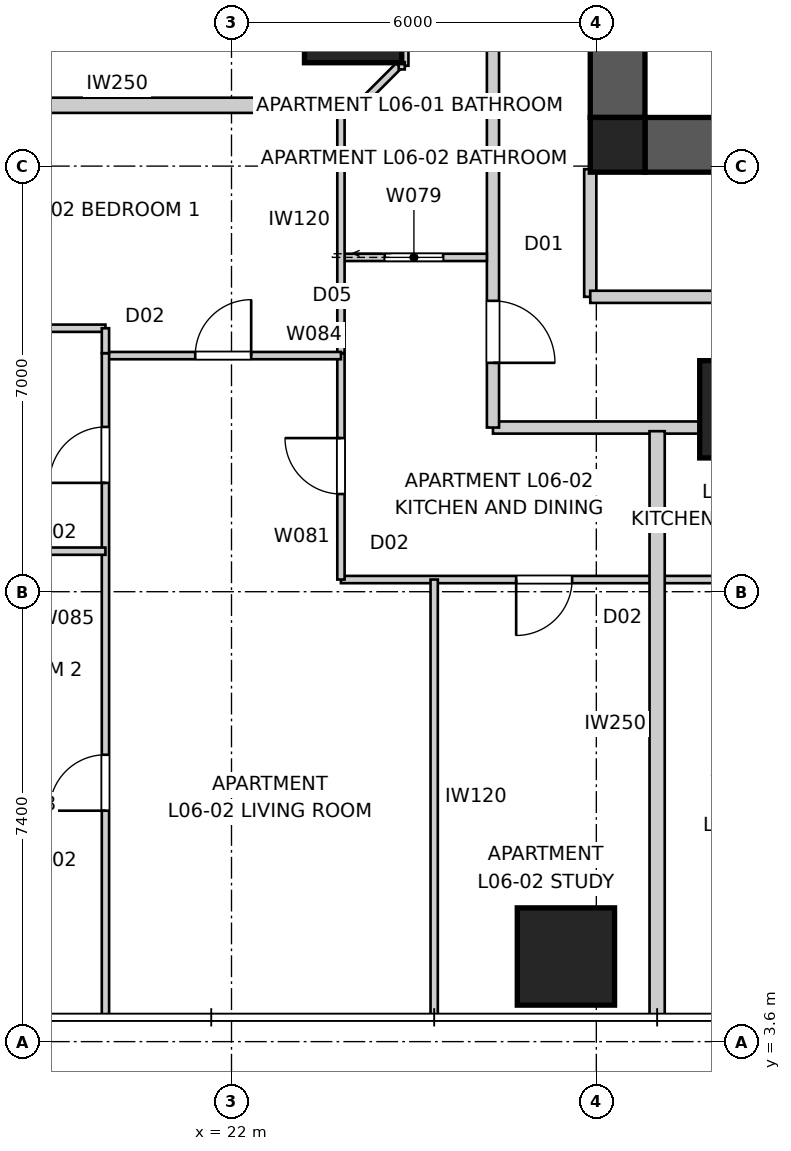
"""IFC4 building model, lengths in metres.
Left out: names, types, materials, properties, quantities, classifications, styles, units other than length and angle.
Written with IfcOpenShell. Run it as: python <this file> out.ifc"""

import sys

from ifc_helpers import new_model, si_unit, direction, frame, frame_2d, origin, origin_2d, place, context, subcontext, project, spatial, polyline, rectangle, outline, extrude, element, fill, save


model = new_model("IFC4")
c1 = context("Model", 3, precision=1e-05, world=origin(), true_north=direction((0.0, 1.0)))
c2 = subcontext(c1, "Body", "Model", "MODEL_VIEW")
j1 = project(units=[si_unit("LENGTHUNIT", "METRE"), si_unit("PLANEANGLEUNIT", "RADIAN")], contexts=[c1])
p1 = place(None, origin())
s1 = spatial("IfcSite", under=j1, at=p1, CompositionType="ELEMENT")
p2 = place(p1, origin())
s2 = spatial("IfcBuilding", under=s1, at=p2, CompositionType="ELEMENT")
p3 = place(p2, frame((0.0, 0.0, 25.2)))
s3 = spatial("IfcBuildingStorey", under=s2, at=p3, CompositionType="ELEMENT", Elevation=25.2)
p4 = place(p3, frame((51.2, 18.35, 0.0), z_axis=(0.0, 0.0, 1.0), x_axis=(-1.0, 0.0, 0.0)))
e1 = element("IfcWall", 1, at=p4, inside=s3, PredefinedType="SHEAR", context=c2, shape_type="SweptSolid", body=[
    extrude(outline(polyline([(0.0, -0.45), (22.4, -0.45), (22.4, -0.025), (22.85, -0.025), (22.85, 0.025), (22.4, 0.025), (22.4, 0.45), (0.0, 0.45), (0.0, 0.025), (-0.45, 0.025), (-0.45, -0.025), (0.0, -0.025), (0.0, -0.45)])), origin(), (0.0, 0.0, 1.0), 3.4),
])
p5 = place(p3, frame((28.35, 41.2, 0.0), z_axis=(0.0, 0.0, 1.0), x_axis=(0.0, -1.0, 0.0)))
e2 = element("IfcWall", 2, at=p5, inside=s3, PredefinedType="SHEAR", context=c2, shape_type="SweptSolid", body=[
    extrude(outline(polyline([(0.0, -0.45), (22.4, -0.45), (22.4, -0.025), (22.85, -0.025), (22.85, 0.025), (22.4, 0.025), (22.4, 0.45), (0.0, 0.45), (0.0, 0.025), (-0.45, 0.025), (-0.45, -0.025), (0.0, -0.025), (0.0, -0.45)])), origin(), (0.0, 0.0, 1.0), 3.4),
])
p6 = place(p5, frame((11.14, 0.0, 0.0)))
e3 = element("IfcOpeningElement", 3, at=p6, cuts=e2, PredefinedType="OPENING", context=c2, shape_type="SweptSolid", body=[
    extrude(rectangle(XDim=1.02, YDim=2.4, at=frame_2d((0.51, 1.2))), frame((0.0, 0.46, 0.0), z_axis=(0.0, -1.0, 0.0), x_axis=(1.0, 0.0, 0.0)), (0.0, 0.0, 1.0), 0.92),
])
p7 = place(p3, frame((28.35, 18.35, 0.0), z_axis=(0.0, 0.0, 1.0), x_axis=(1.0, 0.0, 0.0)))
e4 = element("IfcColumn", 4, at=p7, inside=s3, PredefinedType="COLUMN", context=c2, shape_type="SweptSolid", body=[
    extrude(rectangle(XDim=0.9, YDim=0.9, at=origin_2d()), origin(), (0.0, 0.0, 1.0), 3.4),
])
for number, where, z_axis, x_axis in (
    (5, (27.5, 5.0, 0.0), (0.0, 0.0, 1.0), (1.0, 0.0, 0.0)),
    (6, (24.0, 20.5, 0.0), (0.0, 0.0, 1.0), (1.0, 0.0, 0.0)),
    (7, (30.5, 14.0, 0.0), (0.0, 0.0, 1.0), (1.0, 0.0, 0.0)),
):
    element("IfcColumn", number, at=place(p3, frame(where, z_axis=z_axis, x_axis=x_axis)), inside=s3, PredefinedType="COLUMN", context=c2, shape_type="SweptSolid", body=[
        extrude(rectangle(XDim=1.6, YDim=1.6, at=origin_2d()), origin(), (0.0, 0.0, 1.0), 3.4),
    ])
p8 = place(p3, frame((26.3, 13.7, 0.0), z_axis=(0.0, 0.0, 1.0), x_axis=(1.0, 0.0, 0.0)))
e8 = element("IfcWall", 8, at=p8, inside=s3, PredefinedType="PARTITIONING", context=c2, shape_type="SweptSolid", body=[
    extrude(rectangle(XDim=4.458, YDim=0.2, at=frame_2d((2.229, 0.0))), origin(), (0.0, 0.0, 1.0), 3.25),
])
p9 = place(p3, frame((26.3, 46.3, 0.0), z_axis=(0.0, 0.0, 1.0), x_axis=(0.0, -1.0, 0.0)))
e9 = element("IfcWall", 9, at=p9, inside=s3, PredefinedType="PARTITIONING", context=c2, shape_type="SweptSolid", body=[
    extrude(rectangle(XDim=32.6, YDim=0.2, at=frame_2d((16.3, 0.0))), origin(), (0.0, 0.0, 1.0), 3.25),
])
p10 = place(p9, frame((2.315, 0.0, 0.0)))
e10 = element("IfcOpeningElement", 10, at=p10, cuts=e9, PredefinedType="OPENING", context=c2, shape_type="SweptSolid", body=[
    extrude(rectangle(XDim=1.02, YDim=2.34, at=frame_2d((0.51, 1.17))), frame((0.0, 0.11, 0.0), z_axis=(0.0, -1.0, 0.0), x_axis=(1.0, 0.0, 0.0)), (0.0, 0.0, 1.0), 0.22),
])
p11 = place(p9, frame((10.624, 0.0, 0.0)))
e11 = element("IfcOpeningElement", 11, at=p11, cuts=e9, PredefinedType="OPENING", context=c2, shape_type="SweptSolid", body=[
    extrude(rectangle(XDim=1.02, YDim=2.34, at=frame_2d((0.51, 1.17))), frame((0.0, 0.11, 0.0), z_axis=(0.0, -1.0, 0.0), x_axis=(1.0, 0.0, 0.0)), (0.0, 0.0, 1.0), 0.22),
])
p12 = place(p9, frame((17.848, 0.0, 0.0)))
e12 = element("IfcOpeningElement", 12, at=p12, cuts=e9, PredefinedType="OPENING", context=c2, shape_type="SweptSolid", body=[
    extrude(rectangle(XDim=1.02, YDim=2.34, at=frame_2d((0.51, 1.17))), frame((0.0, 0.11, 0.0), z_axis=(0.0, -1.0, 0.0), x_axis=(1.0, 0.0, 0.0)), (0.0, 0.0, 1.0), 0.22),
])
p13 = place(p9, frame((30.516, 0.0, 0.0)))
e13 = element("IfcOpeningElement", 13, at=p13, cuts=e9, PredefinedType="OPENING", context=c2, shape_type="SweptSolid", body=[
    extrude(rectangle(XDim=1.02, YDim=2.34, at=frame_2d((0.51, 1.17))), frame((0.0, 0.11, 0.0), z_axis=(0.0, -1.0, 0.0), x_axis=(1.0, 0.0, 0.0)), (0.0, 0.0, 1.0), 0.22),
])
p14 = place(p3, frame((29.0, 4.0, 0.0), z_axis=(0.0, 0.0, 1.0), x_axis=(0.0, 1.0, 0.0)))
e14 = element("IfcWall", 14, at=p14, inside=s3, PredefinedType="PARTITIONING", context=c2, shape_type="SweptSolid", body=[
    extrude(rectangle(XDim=9.64, YDim=0.25, at=frame_2d((4.82, 0.0))), origin(), (0.0, 0.0, 1.0), 3.25),
])
p15 = place(p3, frame((14.0, 19.0, 0.0), z_axis=(0.0, 0.0, 1.0), x_axis=(1.0, 0.0, 0.0)))
e15 = element("IfcWall", 15, at=p15, inside=s3, PredefinedType="PARTITIONING", context=c2, shape_type="SweptSolid", body=[
    extrude(rectangle(XDim=12.24, YDim=0.25, at=frame_2d((6.12, 0.0))), origin(), (0.0, 0.0, 1.0), 3.25),
])
p16 = place(p3, frame((27.9, 17.95, 0.0), z_axis=(0.0, 0.0, 1.0), x_axis=(0.0, -1.0, 0.0)))
e16 = element("IfcWall", 16, at=p16, inside=s3, PredefinedType="PARTITIONING", context=c2, shape_type="SweptSolid", body=[
    extrude(rectangle(XDim=2.1, YDim=0.2, at=frame_2d((1.05, 0.0))), origin(), (0.0, 0.0, 1.0), 3.25),
])
p17 = place(p3, frame((27.9, 15.85, 0.0), z_axis=(0.0, 0.0, 1.0), x_axis=(1.0, 0.0, 0.0)))
e17 = element("IfcWall", 17, at=p17, inside=s3, PredefinedType="PARTITIONING", context=c2, shape_type="SweptSolid", body=[
    extrude(rectangle(XDim=24.2, YDim=0.2, at=frame_2d((12.1, 0.0))), origin(), (0.0, 0.0, 1.0), 3.25),
])
p18 = place(p17, frame((12.437, 0.0, 0.0)))
e18 = element("IfcOpeningElement", 18, at=p18, cuts=e17, PredefinedType="OPENING", context=c2, shape_type="SweptSolid", body=[
    extrude(rectangle(XDim=1.02, YDim=2.1, at=frame_2d((0.51, 1.05))), frame((0.0, 0.11, 0.0), z_axis=(0.0, -1.0, 0.0), x_axis=(1.0, 0.0, 0.0)), (0.0, 0.0, 1.0), 0.22),
])
p19 = place(p17, frame((3.544, 0.0, 0.0)))
e19 = element("IfcOpeningElement", 19, at=p19, cuts=e17, PredefinedType="OPENING", context=c2, shape_type="SweptSolid", body=[
    extrude(rectangle(XDim=1.02, YDim=2.1, at=frame_2d((0.51, 1.05))), frame((0.0, 0.11, 0.0), z_axis=(0.0, -1.0, 0.0), x_axis=(1.0, 0.0, 0.0)), (0.0, 0.0, 1.0), 0.22),
])
p20 = place(p17, frame((19.733, 0.0, 0.0)))
e20 = element("IfcOpeningElement", 20, at=p20, cuts=e17, PredefinedType="OPENING", context=c2, shape_type="SweptSolid", body=[
    extrude(rectangle(XDim=1.02, YDim=2.1, at=frame_2d((0.51, 1.05))), frame((0.0, 0.11, 0.0), z_axis=(0.0, -1.0, 0.0), x_axis=(1.0, 0.0, 0.0)), (0.0, 0.0, 1.0), 0.22),
])
p21 = place(p3, frame((24.1, 19.0, 0.0), z_axis=(0.0, 0.0, 1.0), x_axis=(0.707106781187, 0.707106781187, 0.0)))
e21 = element("IfcWall", 21, at=p21, inside=s3, PredefinedType="PARTITIONING", context=c2, shape_type="SweptSolid", body=[
    extrude(rectangle(XDim=0.919, YDim=0.12, at=frame_2d((0.459, 0.0))), origin(), (0.0, 0.0, 1.0), 3.25),
])
p22 = place(p3, frame((24.85, 19.65, 0.0), z_axis=(0.0, 0.0, 1.0), x_axis=(0.0, 1.0, 0.0)))
e22 = element("IfcWall", 22, at=p22, inside=s3, PredefinedType="PARTITIONING", context=c2, shape_type="SweptSolid", body=[
    extrude(rectangle(XDim=1.7, YDim=0.12, at=frame_2d((0.85, 0.0))), origin(), (0.0, 0.0, 1.0), 3.25),
])
p23 = place(p3, frame((23.8, 16.499, 0.0), z_axis=(0.0, 0.0, 1.0), x_axis=(1.0, 0.0, 0.0)))
e23 = element("IfcWall", 23, at=p23, inside=s3, PredefinedType="PARTITIONING", context=c2, shape_type="SweptSolid", body=[
    extrude(rectangle(XDim=2.4, YDim=0.12, at=frame_2d((1.2, 0.0))), origin(), (0.0, 0.0, 1.0), 3.25),
])
p24 = place(p23, frame((0.72, 0.0, 0.0)))
e24 = element("IfcOpeningElement", 24, at=p24, cuts=e23, PredefinedType="OPENING", context=c2, shape_type="SweptSolid", body=[
    extrude(rectangle(XDim=0.96, YDim=2.1, at=frame_2d((0.48, 1.05))), frame((0.0, 0.07, 0.0), z_axis=(0.0, -1.0, 0.0), x_axis=(1.0, 0.0, 0.0)), (0.0, 0.0, 1.0), 0.14),
])
p25 = place(p3, frame((56.2, 11.2, 0.0), z_axis=(0.0, 0.0, 1.0), x_axis=(-1.0, 0.0, 0.0)))
e25 = element("IfcWall", 25, at=p25, inside=s3, PredefinedType="PARTITIONING", context=c2, shape_type="SweptSolid", body=[
    extrude(rectangle(XDim=32.4, YDim=0.12, at=frame_2d((16.2, 0.0))), origin(), (0.0, 0.0, 1.0), 3.25),
])
p26 = place(p25, frame((24.882, 0.0, 0.0)))
e26 = element("IfcOpeningElement", 26, at=p26, cuts=e25, PredefinedType="OPENING", context=c2, shape_type="SweptSolid", body=[
    extrude(rectangle(XDim=0.92, YDim=2.34, at=frame_2d((0.46, 1.17))), frame((0.0, 0.07, 0.0), z_axis=(0.0, -1.0, 0.0), x_axis=(1.0, 0.0, 0.0)), (0.0, 0.0, 1.0), 0.14),
])
p27 = place(p25, frame((22.477, 0.0, 0.0)))
e27 = element("IfcOpeningElement", 27, at=p27, cuts=e25, PredefinedType="OPENING", context=c2, shape_type="SweptSolid", body=[
    extrude(rectangle(XDim=0.92, YDim=2.34, at=frame_2d((0.46, 1.17))), frame((0.0, 0.07, 0.0), z_axis=(0.0, -1.0, 0.0), x_axis=(1.0, 0.0, 0.0)), (0.0, 0.0, 1.0), 0.14),
])
p28 = place(p25, frame((6.598, 0.0, 0.0)))
e28 = element("IfcOpeningElement", 28, at=p28, cuts=e25, PredefinedType="OPENING", context=c2, shape_type="SweptSolid", body=[
    extrude(rectangle(XDim=0.92, YDim=2.34, at=frame_2d((0.46, 1.17))), frame((0.0, 0.07, 0.0), z_axis=(0.0, -1.0, 0.0), x_axis=(1.0, 0.0, 0.0)), (0.0, 0.0, 1.0), 0.14),
])
p29 = place(p25, frame((28.598, 0.0, 0.0)))
e29 = element("IfcOpeningElement", 29, at=p29, cuts=e25, PredefinedType="OPENING", context=c2, shape_type="SweptSolid", body=[
    extrude(rectangle(XDim=0.92, YDim=2.34, at=frame_2d((0.46, 1.17))), frame((0.0, 0.07, 0.0), z_axis=(0.0, -1.0, 0.0), x_axis=(1.0, 0.0, 0.0)), (0.0, 0.0, 1.0), 0.14),
])
p30 = place(p25, frame((2.862, 0.0, 0.0)))
e30 = element("IfcOpeningElement", 30, at=p30, cuts=e25, PredefinedType="OPENING", context=c2, shape_type="SweptSolid", body=[
    extrude(rectangle(XDim=0.96, YDim=2.1, at=frame_2d((0.48, 1.05))), frame((0.0, 0.07, 0.0), z_axis=(0.0, -1.0, 0.0), x_axis=(1.0, 0.0, 0.0)), (0.0, 0.0, 1.0), 0.14),
])
p31 = place(p25, frame((10.363, 0.0, 0.0)))
e31 = element("IfcOpeningElement", 31, at=p31, cuts=e25, PredefinedType="OPENING", context=c2, shape_type="SweptSolid", body=[
    extrude(rectangle(XDim=0.96, YDim=2.1, at=frame_2d((0.48, 1.05))), frame((0.0, 0.07, 0.0), z_axis=(0.0, -1.0, 0.0), x_axis=(1.0, 0.0, 0.0)), (0.0, 0.0, 1.0), 0.14),
])
p32 = place(p25, frame((13.862, 0.0, 0.0)))
e32 = element("IfcOpeningElement", 32, at=p32, cuts=e25, PredefinedType="OPENING", context=c2, shape_type="SweptSolid", body=[
    extrude(rectangle(XDim=0.96, YDim=2.1, at=frame_2d((0.48, 1.05))), frame((0.0, 0.07, 0.0), z_axis=(0.0, -1.0, 0.0), x_axis=(1.0, 0.0, 0.0)), (0.0, 0.0, 1.0), 0.14),
])
p33 = place(p25, frame((17.529, 0.0, 0.0)))
e33 = element("IfcOpeningElement", 33, at=p33, cuts=e25, PredefinedType="OPENING", context=c2, shape_type="SweptSolid", body=[
    extrude(rectangle(XDim=0.96, YDim=2.1, at=frame_2d((0.48, 1.05))), frame((0.0, 0.07, 0.0), z_axis=(0.0, -1.0, 0.0), x_axis=(1.0, 0.0, 0.0)), (0.0, 0.0, 1.0), 0.14),
])
p34 = place(p3, frame((23.8, 11.2, 0.0), z_axis=(0.0, 0.0, 1.0), x_axis=(0.0, 1.0, 0.0)))
e34 = element("IfcWall", 34, at=p34, inside=s3, PredefinedType="PARTITIONING", context=c2, shape_type="SweptSolid", body=[
    extrude(rectangle(XDim=3.723, YDim=0.12, at=frame_2d((1.862, 0.0))), origin(), (0.0, 0.0, 1.0), 3.25),
])
p35 = place(p34, frame((1.407, 0.0, 0.0)))
e35 = element("IfcOpeningElement", 35, at=p35, cuts=e34, PredefinedType="OPENING", context=c2, shape_type="SweptSolid", body=[
    extrude(rectangle(XDim=0.92, YDim=2.34, at=frame_2d((0.46, 1.17))), frame((0.0, 0.07, 0.0), z_axis=(0.0, -1.0, 0.0), x_axis=(1.0, 0.0, 0.0)), (0.0, 0.0, 1.0), 0.14),
])
p36 = place(p3, frame((23.8, 15.233, 0.0), z_axis=(0.0, 0.0, 1.0), x_axis=(0.0, 1.0, 0.0)))
e36 = element("IfcWall", 36, at=p36, inside=s3, PredefinedType="PARTITIONING", context=c2, shape_type="SweptSolid", body=[
    extrude(rectangle(XDim=3.767, YDim=0.12, at=frame_2d((1.883, 0.0))), origin(), (0.0, 0.0, 1.0), 3.25),
])
p37 = place(p3, frame((19.927, 14.883, 0.0), z_axis=(0.0, 0.0, 1.0), x_axis=(1.0, 0.0, 0.0)))
e37 = element("IfcWall", 37, at=p37, inside=s3, PredefinedType="PARTITIONING", context=c2, shape_type="SweptSolid", body=[
    extrude(rectangle(XDim=3.873, YDim=0.12, at=frame_2d((1.937, 0.0))), origin(), (0.0, 0.0, 1.0), 3.25),
])
p38 = place(p37, frame((1.477, 0.0, 0.0)))
e38 = element("IfcOpeningElement", 38, at=p38, cuts=e37, PredefinedType="OPENING", context=c2, shape_type="SweptSolid", body=[
    extrude(rectangle(XDim=0.92, YDim=2.34, at=frame_2d((0.46, 1.17))), frame((0.0, 0.07, 0.0), z_axis=(0.0, -1.0, 0.0), x_axis=(1.0, 0.0, 0.0)), (0.0, 0.0, 1.0), 0.14),
])
p39 = place(p3, frame((19.927, 4.04, 0.0), z_axis=(0.0, 0.0, 1.0), x_axis=(0.0, 1.0, 0.0)))
e39 = element("IfcWall", 39, at=p39, inside=s3, PredefinedType="PARTITIONING", context=c2, shape_type="SweptSolid", body=[
    extrude(rectangle(XDim=10.883, YDim=0.12, at=frame_2d((5.442, 0.0))), origin(), (0.0, 0.0, 1.0), 3.25),
])
p40 = place(p39, frame((3.358, 0.0, 0.0)))
e40 = element("IfcOpeningElement", 40, at=p40, cuts=e39, PredefinedType="OPENING", context=c2, shape_type="SweptSolid", body=[
    extrude(rectangle(XDim=0.92, YDim=2.34, at=frame_2d((0.46, 1.17))), frame((0.0, 0.07, 0.0), z_axis=(0.0, -1.0, 0.0), x_axis=(1.0, 0.0, 0.0)), (0.0, 0.0, 1.0), 0.14),
])
p41 = place(p39, frame((8.75, 0.0, 0.0)))
e41 = element("IfcOpeningElement", 41, at=p41, cuts=e39, PredefinedType="OPENING", context=c2, shape_type="SweptSolid", body=[
    extrude(rectangle(XDim=0.92, YDim=2.34, at=frame_2d((0.46, 1.17))), frame((0.0, 0.07, 0.0), z_axis=(0.0, -1.0, 0.0), x_axis=(1.0, 0.0, 0.0)), (0.0, 0.0, 1.0), 0.14),
])
p42 = place(p3, frame((25.333, 11.2, 0.0), z_axis=(0.0, 0.0, 1.0), x_axis=(0.0, -1.0, 0.0)))
e42 = element("IfcWall", 42, at=p42, inside=s3, PredefinedType="PARTITIONING", context=c2, shape_type="SweptSolid", body=[
    extrude(rectangle(XDim=7.16, YDim=0.12, at=frame_2d((3.58, 0.0))), origin(), (0.0, 0.0, 1.0), 2.637),
])
p43 = place(p3, frame((19.927, 15.333, 0.0), z_axis=(0.0, 0.0, 1.0), x_axis=(-1.0, 0.0, 0.0)))
e43 = element("IfcWall", 43, at=p43, inside=s3, PredefinedType="PARTITIONING", context=c2, shape_type="SweptSolid", body=[
    extrude(rectangle(XDim=5.887, YDim=0.12, at=frame_2d((2.943, 0.0))), origin(), (0.0, 0.0, 1.0), 2.637),
])
p44 = place(p3, frame((14.04, 11.667, 0.0), z_axis=(0.0, 0.0, 1.0), x_axis=(1.0, 0.0, 0.0)))
e44 = element("IfcWall", 44, at=p44, inside=s3, PredefinedType="PARTITIONING", context=c2, shape_type="SweptSolid", body=[
    extrude(rectangle(XDim=5.887, YDim=0.12, at=frame_2d((2.943, 0.0))), origin(), (0.0, 0.0, 1.0), 3.25),
])
p45 = place(p3, frame((24.85, 19.65, 0.0), z_axis=(0.0, 0.0, 1.0), x_axis=(-1.0, 0.0, 0.0)))
e45 = element("IfcWall", 45, at=p45, inside=s3, PredefinedType="PARTITIONING", context=c2, shape_type="SweptSolid", body=[
    extrude(rectangle(XDim=0.1, YDim=0.12, at=frame_2d((0.05, 0.0))), origin(), (0.0, 0.0, 1.0), 3.25),
])
p46 = place(p3, frame((23.8, 15.233, 0.0), z_axis=(0.0, 0.0, 1.0), x_axis=(0.0, -1.0, 0.0)))
e46 = element("IfcWall", 46, at=p46, inside=s3, PredefinedType="PARTITIONING", context=c2, shape_type="SweptSolid", body=[
    extrude(rectangle(XDim=0.31, YDim=0.12, at=frame_2d((0.155, 0.0))), origin(), (0.0, 0.0, 1.0), 3.25),
])
p47 = place(p3, frame((19.927, 15.333, 0.0), z_axis=(0.0, 0.0, 1.0), x_axis=(0.0, -1.0, 0.0)))
e47 = element("IfcWall", 47, at=p47, inside=s3, PredefinedType="PARTITIONING", context=c2, shape_type="SweptSolid", body=[
    extrude(rectangle(XDim=0.41, YDim=0.12, at=frame_2d((0.205, 0.0))), origin(), (0.0, 0.0, 1.0), 3.25),
])
p48 = place(p13, origin())
e48 = element("IfcDoor", 48, at=p48, inside=s3, OperationType="SINGLE_SWING_RIGHT", PredefinedType="DOOR", context=c2, shape_type="SweptSolid", body=[
    extrude(rectangle(XDim=1.02, YDim=2.34, at=frame_2d((0.51, 1.17))), frame((0.0, 0.025, 0.0), z_axis=(0.0, -1.0, 0.0), x_axis=(1.0, 0.0, 0.0)), (0.0, 0.0, 1.0), 0.05),
])
fill(e13, e48)
p49 = place(p35, origin())
e49 = element("IfcDoor", 49, at=p49, inside=s3, OperationType="SINGLE_SWING_RIGHT", PredefinedType="DOOR", context=c2, shape_type="SweptSolid", body=[
    extrude(rectangle(XDim=0.92, YDim=2.34, at=frame_2d((0.46, 1.17))), frame((0.0, 0.025, 0.0), z_axis=(0.0, -1.0, 0.0), x_axis=(1.0, 0.0, 0.0)), (0.0, 0.0, 1.0), 0.05),
])
fill(e35, e49)
p50 = place(p29, origin())
e50 = element("IfcDoor", 50, at=p50, inside=s3, OperationType="SINGLE_SWING_RIGHT", PredefinedType="DOOR", context=c2, shape_type="SweptSolid", body=[
    extrude(rectangle(XDim=0.92, YDim=2.34, at=frame_2d((0.46, 1.17))), frame((0.0, 0.025, 0.0), z_axis=(0.0, -1.0, 0.0), x_axis=(1.0, 0.0, 0.0)), (0.0, 0.0, 1.0), 0.05),
])
fill(e29, e50)
p51 = place(p24, origin())
e51 = element("IfcDoor", 51, at=p51, inside=s3, OperationType="SLIDING_TO_LEFT", PredefinedType="DOOR", context=c2, shape_type="SweptSolid", body=[
    extrude(rectangle(XDim=0.96, YDim=2.1, at=frame_2d((0.48, 1.05))), frame((0.0, 0.025, 0.0), z_axis=(0.0, -1.0, 0.0), x_axis=(1.0, 0.0, 0.0)), (0.0, 0.0, 1.0), 0.05),
])
fill(e24, e51)
p52 = place(p40, origin())
e52 = element("IfcDoor", 52, at=p52, inside=s3, OperationType="SINGLE_SWING_LEFT", PredefinedType="DOOR", context=c2, shape_type="SweptSolid", body=[
    extrude(rectangle(XDim=0.92, YDim=2.34, at=frame_2d((0.46, 1.17))), frame((0.0, 0.025, 0.0), z_axis=(0.0, -1.0, 0.0), x_axis=(1.0, 0.0, 0.0)), (0.0, 0.0, 1.0), 0.05),
])
fill(e40, e52)
p53 = place(p38, origin())
e53 = element("IfcDoor", 53, at=p53, inside=s3, OperationType="SINGLE_SWING_RIGHT", PredefinedType="DOOR", context=c2, shape_type="SweptSolid", body=[
    extrude(rectangle(XDim=0.92, YDim=2.34, at=frame_2d((0.46, 1.17))), frame((0.0, 0.025, 0.0), z_axis=(0.0, -1.0, 0.0), x_axis=(1.0, 0.0, 0.0)), (0.0, 0.0, 1.0), 0.05),
])
fill(e38, e53)
p54 = place(p41, origin())
e54 = element("IfcDoor", 54, at=p54, inside=s3, OperationType="SINGLE_SWING_LEFT", PredefinedType="DOOR", context=c2, shape_type="SweptSolid", body=[
    extrude(rectangle(XDim=0.92, YDim=2.34, at=frame_2d((0.46, 1.17))), frame((0.0, 0.025, 0.0), z_axis=(0.0, -1.0, 0.0), x_axis=(1.0, 0.0, 0.0)), (0.0, 0.0, 1.0), 0.05),
])
fill(e41, e54)
save(model, sys.argv[1])
